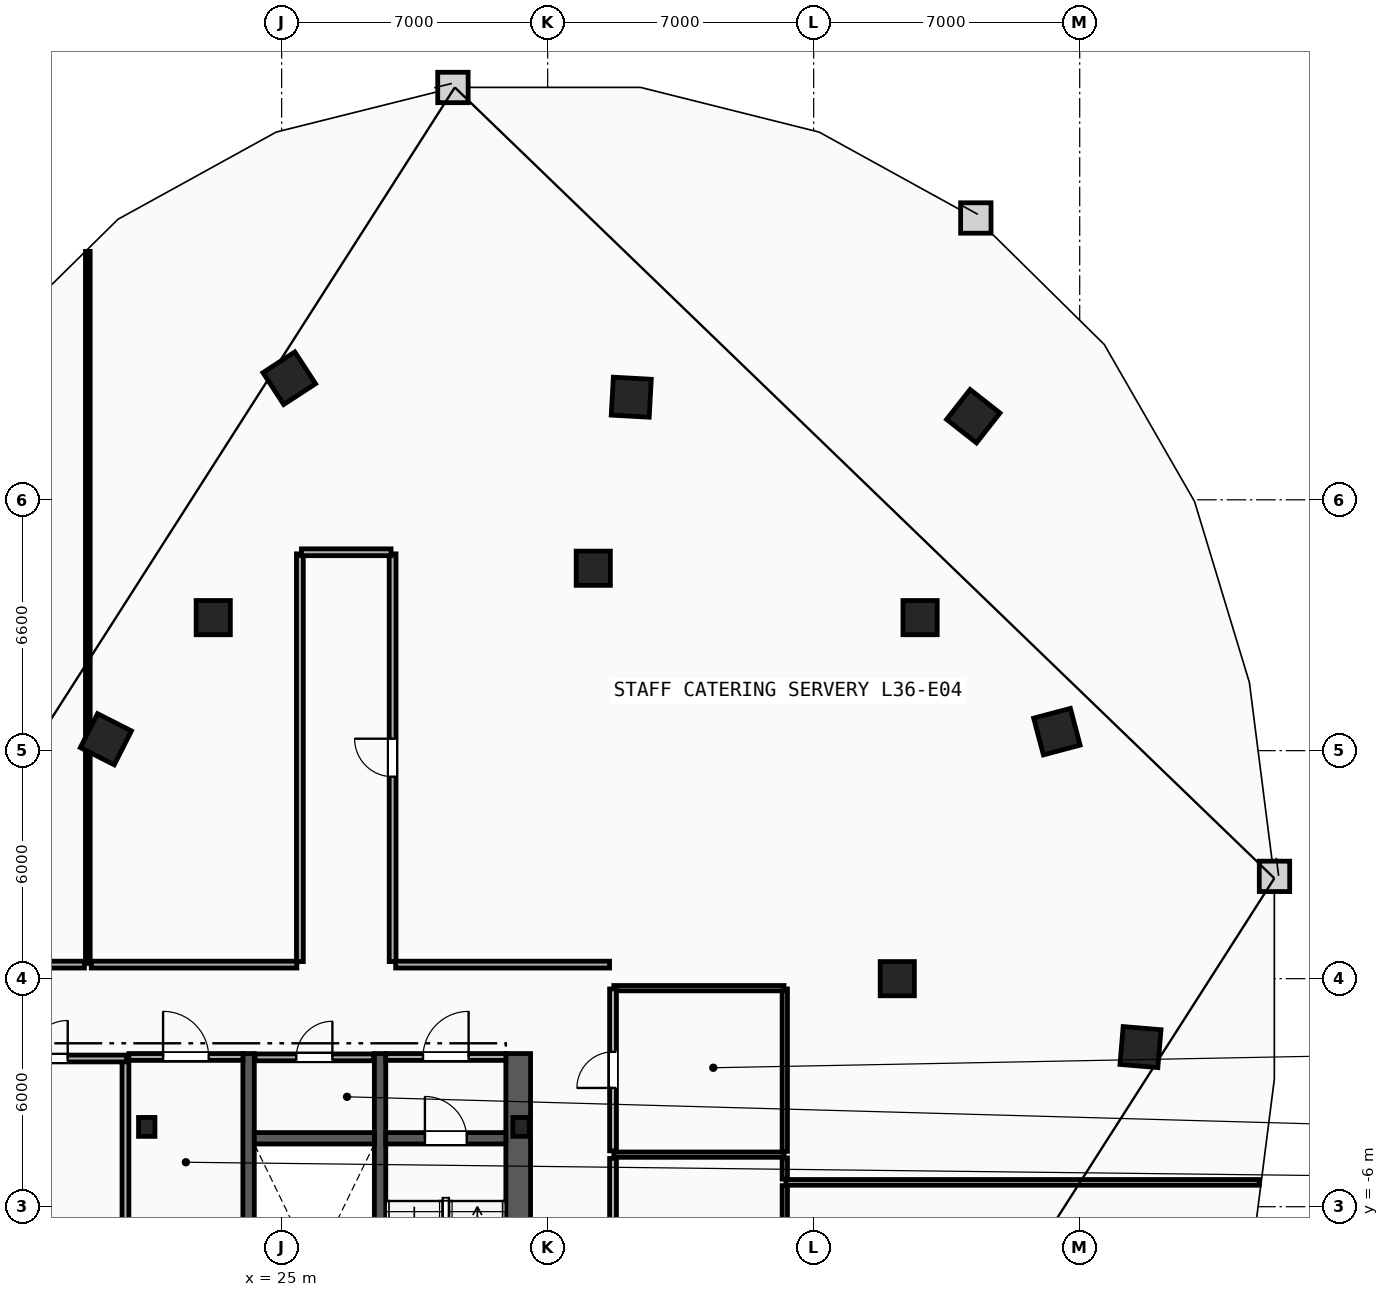
"""IFC4 building model, lengths in metres.
Left out: names, types, materials, properties, quantities, classifications, styles, units other than length and angle.
Written with IfcOpenShell. Run it as: python <this file> out.ifc"""

import sys

from ifc_helpers import new_model, si_unit, direction, frame, frame_2d, origin, origin_2d, place, context, subcontext, project, spatial, rectangle, i_section, extrude, element, fill, save


model = new_model("IFC4")
c1 = context("Model", 3, precision=1e-05, world=origin(), true_north=direction((0.0, 1.0)))
c2 = subcontext(c1, "Body", "Model", "MODEL_VIEW")
j1 = project(units=[si_unit("LENGTHUNIT", "METRE"), si_unit("PLANEANGLEUNIT", "RADIAN")], contexts=[c1])
p1 = place(None, origin())
s1 = spatial("IfcSite", under=j1, at=p1, CompositionType="ELEMENT")
p2 = place(p1, origin())
s2 = spatial("IfcBuilding", under=s1, at=p2, CompositionType="ELEMENT")
p3 = place(p2, frame((0.0, 0.0, 140.4)))
s3 = spatial("IfcBuildingStorey", under=s2, at=p3, CompositionType="ELEMENT", Elevation=140.4)
for number, where, z_axis, x_axis in (
    (1, (31.3, -3.9, 0.0), (0.0, 0.0, 1.0), (1.0, 0.0, 0.0)),
    (2, (21.45, -3.9, 0.0), (0.0, 0.0, 1.0), (1.0, 0.0, 0.0)),
):
    element("IfcColumn", number, at=place(p3, frame(where, z_axis=z_axis, x_axis=x_axis)), inside=s3, PredefinedType="COLUMN", context=c2, shape_type="SweptSolid", body=[
        extrude(i_section(OverallWidth=0.432, OverallDepth=0.498, WebThickness=0.056, FlangeThickness=0.089, FilletRadius=0.018, at=origin_2d()), origin(), (0.0, 0.0, 1.0), 3.6),
    ])
for number, where, z_axis, x_axis in (
    (3, (41.2, 0.0, 0.0), (0.0, 0.0, 1.0), (1.0, 0.0, 0.0)),
    (4, (41.8, 9.5, 0.0), (0.0, 0.0, 1.0), (1.0, 0.0, 0.0)),
    (5, (33.2, 10.8, 0.0), (0.0, 0.0, 1.0), (1.0, 0.0, 0.0)),
    (6, (23.2, 9.5, 0.0), (0.0, 0.0, 1.0), (1.0, 0.0, 0.0)),
):
    element("IfcColumn", number, at=place(p3, frame(where, z_axis=z_axis, x_axis=x_axis)), inside=s3, PredefinedType="COLUMN", context=c2, shape_type="SweptSolid", body=[
        extrude(rectangle(XDim=0.9, YDim=0.9, at=origin_2d()), origin(), (0.0, 0.0, 1.0), 3.6),
    ])
for number, where, z_axis, x_axis in (
    (7, (47.6, -1.8, 0.0), (0.0, 0.0, 1.0), (0.084, 0.997, 0.0)),
    (8, (45.4, 6.5, 0.0), (0.0, 0.0, 1.0), (-0.256, 0.967, 0.0)),
    (9, (43.2, 14.8, 0.0), (0.0, 0.0, 1.0), (-0.786, 0.618, 0.0)),
    (10, (34.2, 15.3, 0.0), (0.0, 0.0, 1.0), (-0.998, 0.055, 0.0)),
    (11, (25.2, 15.8, 0.0), (0.0, 0.0, 1.0), (-0.838, -0.546, 0.0)),
    (12, (20.375, 6.3, 0.0), (0.0, 0.0, 1.0), (-0.453, -0.892, 0.0)),
):
    element("IfcColumn", number, at=place(p3, frame(where, z_axis=z_axis, x_axis=x_axis)), inside=s3, PredefinedType="COLUMN", context=c2, shape_type="SweptSolid", body=[
        extrude(rectangle(XDim=1.0, YDim=1.0, at=origin_2d()), origin(), (0.0, 0.0, 1.0), 3.6),
    ])
p4 = place(p3, frame((31.225, -15.3, 0.0), z_axis=(0.0, 0.0, 1.0), x_axis=(0.0, 1.0, 0.0)))
e13 = element("IfcWall", 13, at=p4, inside=s3, PredefinedType="SHEAR", context=c2, shape_type="SweptSolid", body=[
    extrude(rectangle(XDim=13.33, YDim=0.65, at=frame_2d((6.665, 0.0))), origin(), (0.0, 0.0, 1.0), 3.36),
])
for number, where, z_axis, x_axis in (
    (14, (27.59, -12.65, 0.0), (0.0, 0.0, 1.0), (0.0, 1.0, 0.0)),
    (15, (24.13, -12.65, 0.0), (0.0, 0.0, 1.0), (0.0, 1.0, 0.0)),
):
    element("IfcWall", number, at=place(p3, frame(where, z_axis=z_axis, x_axis=x_axis)), inside=s3, PredefinedType="SHEAR", context=c2, shape_type="SweptSolid", body=[
        extrude(rectangle(XDim=10.68, YDim=0.3, at=frame_2d((5.34, 0.0))), origin(), (0.0, 0.0, 1.0), 3.36),
    ])
p5 = place(p3, frame((27.74, -4.2, 0.0), z_axis=(0.0, 0.0, 1.0), x_axis=(1.0, 0.0, 0.0)))
e16 = element("IfcWall", 16, at=p5, inside=s3, PredefinedType="SHEAR", context=c2, shape_type="SweptSolid", body=[
    extrude(rectangle(XDim=3.16, YDim=0.3, at=frame_2d((1.58, 0.0))), origin(), (0.0, 0.0, 1.0), 3.36),
])
p6 = place(p5, frame((1.03, 0.0, 0.0)))
e17 = element("IfcOpeningElement", 17, at=p6, cuts=e16, PredefinedType="OPENING", context=c2, shape_type="SweptSolid", body=[
    extrude(rectangle(XDim=1.1, YDim=2.15, at=frame_2d((0.55, 1.075))), frame((0.0, 0.16, 0.0), z_axis=(0.0, -1.0, 0.0), x_axis=(1.0, 0.0, 0.0)), (0.0, 0.0, 1.0), 0.32),
])
p7 = place(p3, frame((24.28, -4.2, 0.0), z_axis=(0.0, 0.0, 1.0), x_axis=(1.0, 0.0, 0.0)))
e18 = element("IfcWall", 18, at=p7, inside=s3, PredefinedType="SHEAR", context=c2, shape_type="SweptSolid", body=[
    extrude(rectangle(XDim=3.16, YDim=0.3, at=frame_2d((1.58, 0.0))), origin(), (0.0, 0.0, 1.0), 3.36),
])
p8 = place(p3, frame((20.89, -7.45, 0.0), z_axis=(0.0, 0.0, 1.0), x_axis=(0.0, 1.0, 0.0)))
e19 = element("IfcWall", 19, at=p8, inside=s3, PredefinedType="PARTITIONING", context=c2, shape_type="SweptSolid", body=[
    extrude(rectangle(XDim=5.3, YDim=0.18, at=frame_2d((2.65, 0.0))), origin(), (0.0, 0.0, 1.0), 3.36),
])
p9 = place(p3, frame((20.98, -2.06, 0.0), z_axis=(0.0, 0.0, 1.0), x_axis=(1.0, 0.0, 0.0)))
e20 = element("IfcWall", 20, at=p9, inside=s3, PredefinedType="PARTITIONING", context=c2, shape_type="SweptSolid", body=[
    extrude(rectangle(XDim=3.0, YDim=0.18, at=frame_2d((1.5, 0.0))), origin(), (0.0, 0.0, 1.0), 3.36),
])
p10 = place(p9, frame((0.9, 0.0, 0.0)))
e21 = element("IfcOpeningElement", 21, at=p10, cuts=e20, PredefinedType="OPENING", context=c2, shape_type="SweptSolid", body=[
    extrude(rectangle(XDim=1.2, YDim=2.15, at=frame_2d((0.6, 1.075))), frame((0.0, 0.1, 0.0), z_axis=(0.0, -1.0, 0.0), x_axis=(1.0, 0.0, 0.0)), (0.0, 0.0, 1.0), 0.2),
])
p11 = place(p3, frame((27.74, -2.06, 0.0), z_axis=(0.0, 0.0, 1.0), x_axis=(1.0, 0.0, 0.0)))
e22 = element("IfcWall", 22, at=p11, inside=s3, PredefinedType="PARTITIONING", context=c2, shape_type="SweptSolid", body=[
    extrude(rectangle(XDim=3.16, YDim=0.18, at=frame_2d((1.58, 0.0))), origin(), (0.0, 0.0, 1.0), 3.36),
])
p12 = place(p11, frame((0.98, 0.0, 0.0)))
e23 = element("IfcOpeningElement", 23, at=p12, cuts=e22, PredefinedType="OPENING", context=c2, shape_type="SweptSolid", body=[
    extrude(rectangle(XDim=1.2, YDim=2.15, at=frame_2d((0.6, 1.075))), frame((0.0, 0.1, 0.0), z_axis=(0.0, -1.0, 0.0), x_axis=(1.0, 0.0, 0.0)), (0.0, 0.0, 1.0), 0.2),
])
p13 = place(p3, frame((24.3, -2.07, 0.0), z_axis=(0.0, 0.0, 1.0), x_axis=(1.0, 0.0, 0.0)))
e24 = element("IfcWall", 24, at=p13, inside=s3, PredefinedType="PARTITIONING", context=c2, shape_type="SweptSolid", body=[
    extrude(rectangle(XDim=3.12, YDim=0.18, at=frame_2d((1.56, 0.0))), origin(), (0.0, 0.0, 1.0), 3.36),
])
p14 = place(p13, frame((1.085, 0.0, 0.0)))
e25 = element("IfcOpeningElement", 25, at=p14, cuts=e24, PredefinedType="OPENING", context=c2, shape_type="SweptSolid", body=[
    extrude(rectangle(XDim=0.95, YDim=2.1, at=frame_2d((0.475, 1.05))), frame((0.0, 0.1, 0.0), z_axis=(0.0, -1.0, 0.0), x_axis=(1.0, 0.0, 0.0)), (0.0, 0.0, 1.0), 0.2),
])
p15 = place(p3, frame((38.24, -8.89, 0.0), z_axis=(0.0, 0.0, 1.0), x_axis=(0.0, 1.0, 0.0)))
e26 = element("IfcWall", 26, at=p15, inside=s3, PredefinedType="PARTITIONING", context=c2, shape_type="SweptSolid", body=[
    extrude(rectangle(XDim=3.445, YDim=0.14, at=frame_2d((1.722, 0.0))), origin(), (0.0, 0.0, 1.0), 3.36),
])
p16 = place(p3, frame((38.24, -5.275, 0.0), z_axis=(0.0, 0.0, 1.0), x_axis=(0.0, 1.0, 0.0)))
e27 = element("IfcWall", 27, at=p16, inside=s3, PredefinedType="PARTITIONING", context=c2, shape_type="SweptSolid", body=[
    extrude(rectangle(XDim=0.56, YDim=0.14, at=frame_2d((0.28, 0.0))), origin(), (0.0, 0.0, 1.0), 3.36),
])
p17 = place(p3, frame((38.24, -4.545, 0.0), z_axis=(0.0, 0.0, 1.0), x_axis=(0.0, 1.0, 0.0)))
e28 = element("IfcWall", 28, at=p17, inside=s3, PredefinedType="PARTITIONING", context=c2, shape_type="SweptSolid", body=[
    extrude(rectangle(XDim=4.275, YDim=0.14, at=frame_2d((2.137, 0.0))), origin(), (0.0, 0.0, 1.0), 3.36),
])
for number, where, z_axis, x_axis in (
    (29, (33.74, -0.25, 0.0), (0.0, 0.0, 1.0), (1.0, 0.0, 0.0)),
    (30, (33.74, -4.63, 0.0), (0.0, 0.0, 1.0), (1.0, 0.0, 0.0)),
):
    element("IfcWall", number, at=place(p3, frame(where, z_axis=z_axis, x_axis=x_axis)), inside=s3, PredefinedType="PARTITIONING", context=c2, shape_type="SweptSolid", body=[
        extrude(rectangle(XDim=4.48, YDim=0.14, at=frame_2d((2.24, 0.0))), origin(), (0.0, 0.0, 1.0), 3.36),
    ])
p18 = place(p3, frame((33.72, -4.53, 0.0), z_axis=(0.0, 0.0, 1.0), x_axis=(0.0, 1.0, 0.0)))
e31 = element("IfcWall", 31, at=p18, inside=s3, PredefinedType="PARTITIONING", context=c2, shape_type="SweptSolid", body=[
    extrude(rectangle(XDim=4.26, YDim=0.18, at=frame_2d((2.13, 0.0))), origin(), (0.0, 0.0, 1.0), 3.36),
])
p19 = place(p18, frame((1.655, 0.0, 0.0)))
e32 = element("IfcOpeningElement", 32, at=p19, cuts=e31, PredefinedType="OPENING", context=c2, shape_type="SweptSolid", body=[
    extrude(rectangle(XDim=0.95, YDim=2.1, at=frame_2d((0.475, 1.05))), frame((0.0, 0.1, 0.0), z_axis=(0.0, -1.0, 0.0), x_axis=(1.0, 0.0, 0.0)), (0.0, 0.0, 1.0), 0.2),
])
p20 = place(p3, frame((33.72, -8.89, 0.0), z_axis=(0.0, 0.0, 1.0), x_axis=(0.0, 1.0, 0.0)))
e33 = element("IfcWall", 33, at=p20, inside=s3, PredefinedType="PARTITIONING", context=c2, shape_type="SweptSolid", body=[
    extrude(rectangle(XDim=4.16, YDim=0.18, at=frame_2d((2.08, 0.0))), origin(), (0.0, 0.0, 1.0), 3.36),
])
p21 = place(p20, frame((1.58, 0.0, 0.0)))
e34 = element("IfcOpeningElement", 34, at=p21, cuts=e33, PredefinedType="OPENING", context=c2, shape_type="SweptSolid", body=[
    extrude(rectangle(XDim=1.0, YDim=2.15, at=frame_2d((0.5, 1.075))), frame((0.0, 0.1, 0.0), z_axis=(0.0, -1.0, 0.0), x_axis=(1.0, 0.0, 0.0)), (0.0, 0.0, 1.0), 0.2),
])
p22 = place(p3, frame((19.9, 0.4, 0.0), z_axis=(0.0, 0.0, 1.0), x_axis=(0.0, 1.0, 0.0)))
e35 = element("IfcWall", 35, at=p22, inside=s3, PredefinedType="PARTITIONING", context=c2, shape_type="SweptSolid", body=[
    extrude(rectangle(XDim=18.737, YDim=0.125, at=frame_2d((9.368, 0.0))), origin(), (0.0, 0.0, 1.0), 3.36),
])
p23 = place(p3, frame((38.27, -5.36, 0.0), z_axis=(0.0, 0.0, 1.0), x_axis=(1.0, 0.0, 0.0)))
e36 = element("IfcWall", 36, at=p23, inside=s3, PredefinedType="PARTITIONING", context=c2, shape_type="SweptSolid", body=[
    extrude(rectangle(XDim=12.455, YDim=0.15, at=frame_2d((6.228, 0.0))), origin(), (0.0, 0.0, 1.0), 3.36),
])
p24 = place(p3, frame((16.822, -2.1, 0.0), z_axis=(0.0, 0.0, 1.0), x_axis=(1.0, 0.0, 0.0)))
e37 = element("IfcWall", 37, at=p24, inside=s3, PredefinedType="PARTITIONING", context=c2, shape_type="SweptSolid", body=[
    extrude(rectangle(XDim=4.098, YDim=0.18, at=frame_2d((2.049, 0.0))), origin(), (0.0, 0.0, 1.0), 3.36),
])
p25 = place(p24, frame((1.549, 0.0, 0.0)))
e38 = element("IfcOpeningElement", 38, at=p25, cuts=e37, PredefinedType="OPENING", context=c2, shape_type="SweptSolid", body=[
    extrude(rectangle(XDim=1.0, YDim=2.15, at=frame_2d((0.5, 1.075))), frame((0.0, 0.1, 0.0), z_axis=(0.0, -1.0, 0.0), x_axis=(1.0, 0.0, 0.0)), (0.0, 0.0, 1.0), 0.2),
])
p26 = place(p3, frame((19.81, 0.37, 0.0), z_axis=(0.0, 0.0, 1.0), x_axis=(-1.0, 0.0, 0.0)))
e39 = element("IfcWall", 39, at=p26, inside=s3, PredefinedType="PARTITIONING", context=c2, shape_type="SweptSolid", body=[
    extrude(rectangle(XDim=2.989, YDim=0.18, at=frame_2d((1.494, 0.0))), origin(), (0.0, 0.0, 1.0), 3.36),
])
p27 = place(p3, frame((27.92, 0.45, 0.0), z_axis=(0.0, 0.0, 1.0), x_axis=(0.0, 1.0, 0.0)))
e40 = element("IfcWall", 40, at=p27, inside=s3, PredefinedType="PARTITIONING", context=c2, shape_type="SweptSolid", body=[
    extrude(rectangle(XDim=10.729, YDim=0.18, at=frame_2d((5.364, 0.0))), origin(), (0.0, 0.0, 1.0), 3.36),
])
p28 = place(p27, frame((4.864, 0.0, 0.0)))
e41 = element("IfcOpeningElement", 41, at=p28, cuts=e40, PredefinedType="OPENING", context=c2, shape_type="SweptSolid", body=[
    extrude(rectangle(XDim=1.0, YDim=2.15, at=frame_2d((0.5, 1.075))), frame((0.0, 0.1, 0.0), z_axis=(0.0, -1.0, 0.0), x_axis=(1.0, 0.0, 0.0)), (0.0, 0.0, 1.0), 0.2),
])
p29 = place(p3, frame((25.48, 11.178, 0.0), z_axis=(0.0, 0.0, 1.0), x_axis=(0.0, -1.0, 0.0)))
e42 = element("IfcWall", 42, at=p29, inside=s3, PredefinedType="PARTITIONING", context=c2, shape_type="SweptSolid", body=[
    extrude(rectangle(XDim=10.729, YDim=0.18, at=frame_2d((5.364, 0.0))), origin(), (0.0, 0.0, 1.0), 3.36),
])
p30 = place(p3, frame((33.628, 0.37, 0.0), z_axis=(0.0, 0.0, 1.0), x_axis=(-1.0, 0.0, 0.0)))
e43 = element("IfcWall", 43, at=p30, inside=s3, PredefinedType="PARTITIONING", context=c2, shape_type="SweptSolid", body=[
    extrude(rectangle(XDim=5.628, YDim=0.18, at=frame_2d((2.814, 0.0))), origin(), (0.0, 0.0, 1.0), 3.36),
])
p31 = place(p3, frame((25.4, 0.37, 0.0), z_axis=(0.0, 0.0, 1.0), x_axis=(-1.0, 0.0, 0.0)))
e44 = element("IfcWall", 44, at=p31, inside=s3, PredefinedType="PARTITIONING", context=c2, shape_type="SweptSolid", body=[
    extrude(rectangle(XDim=5.41, YDim=0.18, at=frame_2d((2.705, 0.0))), origin(), (0.0, 0.0, 1.0), 3.36),
])
p32 = place(p3, frame((27.878, 11.22, 0.0), z_axis=(0.0, 0.0, 1.0), x_axis=(-1.0, 0.0, 0.0)))
e45 = element("IfcWall", 45, at=p32, inside=s3, PredefinedType="PARTITIONING", context=c2, shape_type="SweptSolid", body=[
    extrude(rectangle(XDim=2.357, YDim=0.18, at=frame_2d((1.178, 0.0))), origin(), (0.0, 0.0, 1.0), 3.36),
])
p33 = place(p6, origin())
e46 = element("IfcDoor", 46, at=p33, inside=s3, OperationType="SINGLE_SWING_LEFT", PredefinedType="DOOR", context=c2, shape_type="SweptSolid", body=[
    extrude(rectangle(XDim=1.1, YDim=2.15, at=frame_2d((0.55, 1.075))), frame((0.0, 0.025, 0.0), z_axis=(0.0, -1.0, 0.0), x_axis=(1.0, 0.0, 0.0)), (0.0, 0.0, 1.0), 0.05),
])
fill(e17, e46)
p34 = place(p10, origin())
e47 = element("IfcDoor", 47, at=p34, inside=s3, OperationType="SINGLE_SWING_LEFT", PredefinedType="DOOR", context=c2, shape_type="SweptSolid", body=[
    extrude(rectangle(XDim=1.2, YDim=2.15, at=frame_2d((0.6, 1.075))), frame((0.0, 0.025, 0.0), z_axis=(0.0, -1.0, 0.0), x_axis=(1.0, 0.0, 0.0)), (0.0, 0.0, 1.0), 0.05),
])
fill(e21, e47)
p35 = place(p12, origin())
e48 = element("IfcDoor", 48, at=p35, inside=s3, OperationType="SINGLE_SWING_RIGHT", PredefinedType="DOOR", context=c2, shape_type="SweptSolid", body=[
    extrude(rectangle(XDim=1.2, YDim=2.15, at=frame_2d((0.6, 1.075))), frame((0.0, 0.025, 0.0), z_axis=(0.0, -1.0, 0.0), x_axis=(1.0, 0.0, 0.0)), (0.0, 0.0, 1.0), 0.05),
])
fill(e23, e48)
p36 = place(p28, origin())
e49 = element("IfcDoor", 49, at=p36, inside=s3, OperationType="SINGLE_SWING_RIGHT", PredefinedType="DOOR", context=c2, shape_type="SweptSolid", body=[
    extrude(rectangle(XDim=1.0, YDim=2.15, at=frame_2d((0.5, 1.075))), frame((0.0, 0.025, 0.0), z_axis=(0.0, -1.0, 0.0), x_axis=(1.0, 0.0, 0.0)), (0.0, 0.0, 1.0), 0.05),
])
fill(e41, e49)
p37 = place(p19, origin())
e50 = element("IfcDoor", 50, at=p37, inside=s3, OperationType="SINGLE_SWING_LEFT", PredefinedType="DOOR", context=c2, shape_type="SweptSolid", body=[
    extrude(rectangle(XDim=0.95, YDim=2.1, at=frame_2d((0.475, 1.05))), frame((0.0, 0.025, 0.0), z_axis=(0.0, -1.0, 0.0), x_axis=(1.0, 0.0, 0.0)), (0.0, 0.0, 1.0), 0.05),
])
fill(e32, e50)
p38 = place(p25, origin())
e51 = element("IfcDoor", 51, at=p38, inside=s3, OperationType="SINGLE_SWING_RIGHT", PredefinedType="DOOR", context=c2, shape_type="SweptSolid", body=[
    extrude(rectangle(XDim=1.0, YDim=2.15, at=frame_2d((0.5, 1.075))), frame((0.0, 0.025, 0.0), z_axis=(0.0, -1.0, 0.0), x_axis=(1.0, 0.0, 0.0)), (0.0, 0.0, 1.0), 0.05),
])
fill(e38, e51)
p39 = place(p14, origin())
e52 = element("IfcDoor", 52, at=p39, inside=s3, OperationType="SINGLE_SWING_RIGHT", PredefinedType="DOOR", context=c2, shape_type="SweptSolid", body=[
    extrude(rectangle(XDim=0.95, YDim=2.1, at=frame_2d((0.475, 1.05))), frame((0.0, 0.025, 0.0), z_axis=(0.0, -1.0, 0.0), x_axis=(1.0, 0.0, 0.0)), (0.0, 0.0, 1.0), 0.05),
])
fill(e25, e52)
save(model, sys.argv[1])
